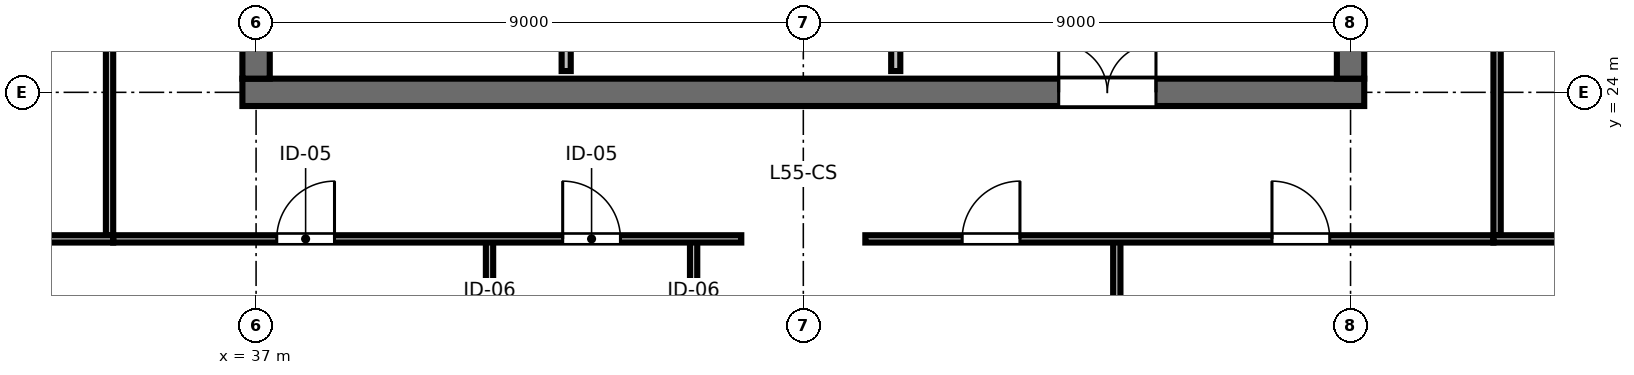
"""IFC4 building model, lengths in metres.
Left out: names, types, materials, properties, quantities, classifications, styles, units other than length and angle.
Written with IfcOpenShell. Run it as: python <this file> out.ifc"""

import sys

from ifc_helpers import new_model, si_unit, direction, frame, frame_2d, origin, place, context, subcontext, project, spatial, rectangle, extrude, element, fill, save


model = new_model("IFC4")
c1 = context("Model", 3, precision=1e-05, world=origin(), true_north=direction((0.0, 1.0)))
c2 = subcontext(c1, "Body", "Model", "MODEL_VIEW")
j1 = project(units=[si_unit("LENGTHUNIT", "METRE"), si_unit("PLANEANGLEUNIT", "RADIAN")], contexts=[c1])
p1 = place(None, origin())
s1 = spatial("IfcSite", under=j1, at=p1, CompositionType="ELEMENT")
p2 = place(p1, origin())
s2 = spatial("IfcBuilding", under=s1, at=p2, CompositionType="ELEMENT")
p3 = place(p2, frame((0.0, 0.0, 209.4)))
s3 = spatial("IfcBuildingStorey", under=s2, at=p3, CompositionType="ELEMENT", Elevation=209.4)
p4 = place(p3, frame((36.775, 24.0, 0.0), z_axis=(0.0, 0.0, 1.0), x_axis=(1.0, 0.0, 0.0)))
e1 = element("IfcWall", 1, at=p4, inside=s3, PredefinedType="SHEAR", context=c2, shape_type="SweptSolid", body=[
    extrude(rectangle(XDim=18.45, YDim=0.45, at=frame_2d((9.225, 0.0))), origin(), (0.0, 0.0, 1.0), 3.36),
])
p5 = place(p4, frame((13.425, 0.0, 0.0)))
e2 = element("IfcOpeningElement", 2, at=p5, cuts=e1, PredefinedType="OPENING", context=c2, shape_type="SweptSolid", body=[
    extrude(rectangle(XDim=1.6, YDim=2.15, at=frame_2d((0.8, 1.075))), frame((0.0, 0.235, 0.0), z_axis=(0.0, -1.0, 0.0), x_axis=(1.0, 0.0, 0.0)), (0.0, 0.0, 1.0), 0.47),
])
p6 = place(p3, frame((37.0, 24.225, 0.0), z_axis=(0.0, 0.0, 1.0), x_axis=(0.0, 1.0, 0.0)))
e3 = element("IfcWall", 3, at=p6, inside=s3, PredefinedType="SHEAR", context=c2, shape_type="SweptSolid", body=[
    extrude(rectangle(XDim=15.55, YDim=0.45, at=frame_2d((7.775, 0.0))), origin(), (0.0, 0.0, 1.0), 3.36),
])
p7 = place(p6, frame((5.3, 0.0, 0.0)))
e4 = element("IfcOpeningElement", 4, at=p7, cuts=e3, PredefinedType="OPENING", context=c2, shape_type="SweptSolid", body=[
    extrude(rectangle(XDim=1.15, YDim=2.15, at=frame_2d((0.575, 1.075))), frame((0.0, 0.235, 0.0), z_axis=(0.0, -1.0, 0.0), x_axis=(1.0, 0.0, 0.0)), (0.0, 0.0, 1.0), 0.47),
])
p8 = place(p3, frame((55.0, 24.225, 0.0), z_axis=(0.0, 0.0, 1.0), x_axis=(0.0, 1.0, 0.0)))
e5 = element("IfcWall", 5, at=p8, inside=s3, PredefinedType="SHEAR", context=c2, shape_type="SweptSolid", body=[
    extrude(rectangle(XDim=15.55, YDim=0.45, at=frame_2d((7.775, 0.0))), origin(), (0.0, 0.0, 1.0), 3.36),
])
p9 = place(p8, frame((5.3, 0.0, 0.0)))
e6 = element("IfcOpeningElement", 6, at=p9, cuts=e5, PredefinedType="OPENING", context=c2, shape_type="SweptSolid", body=[
    extrude(rectangle(XDim=1.15, YDim=2.15, at=frame_2d((0.575, 1.075))), frame((0.0, 0.235, 0.0), z_axis=(0.0, -1.0, 0.0), x_axis=(1.0, 0.0, 0.0)), (0.0, 0.0, 1.0), 0.47),
])
p10 = place(p3, frame((42.1, 24.35, 0.0), z_axis=(0.0, 0.0, 1.0), x_axis=(0.0, 1.0, 0.0)))
e7 = element("IfcWall", 7, at=p10, inside=s3, PredefinedType="PARTITIONING", context=c2, shape_type="SweptSolid", body=[
    extrude(rectangle(XDim=3.9, YDim=0.15, at=frame_2d((1.95, 0.0))), origin(), (0.0, 0.0, 1.0), 3.375),
])
p11 = place(p10, frame((1.5, 0.0, 0.0)))
e8 = element("IfcOpeningElement", 8, at=p11, cuts=e7, PredefinedType="OPENING", context=c2, shape_type="SweptSolid", body=[
    extrude(rectangle(XDim=0.9, YDim=2.15, at=frame_2d((0.45, 1.075))), frame((0.0, 0.085, 0.0), z_axis=(0.0, -1.0, 0.0), x_axis=(1.0, 0.0, 0.0)), (0.0, 0.0, 1.0), 0.17),
])
p12 = place(p3, frame((47.52, 24.35, 0.0), z_axis=(0.0, 0.0, 1.0), x_axis=(0.0, 1.0, 0.0)))
e9 = element("IfcWall", 9, at=p12, inside=s3, PredefinedType="PARTITIONING", context=c2, shape_type="SweptSolid", body=[
    extrude(rectangle(XDim=3.9, YDim=0.15, at=frame_2d((1.95, 0.0))), origin(), (0.0, 0.0, 1.0), 3.375),
])
p13 = place(p12, frame((0.35, 0.0, 0.0)))
e10 = element("IfcOpeningElement", 10, at=p13, cuts=e9, PredefinedType="OPENING", context=c2, shape_type="SweptSolid", body=[
    extrude(rectangle(XDim=0.9, YDim=2.15, at=frame_2d((0.45, 1.075))), frame((0.0, 0.085, 0.0), z_axis=(0.0, -1.0, 0.0), x_axis=(1.0, 0.0, 0.0)), (0.0, 0.0, 1.0), 0.17),
])
p14 = place(p3, frame((40.839, 21.59, 0.0), z_axis=(0.0, 0.0, 1.0), x_axis=(0.0, -1.0, 0.0)))
e11 = element("IfcWall", 11, at=p14, inside=s3, PredefinedType="PARTITIONING", context=c2, shape_type="SweptSolid", body=[
    extrude(rectangle(XDim=7.574, YDim=0.12, at=frame_2d((3.787, 0.0))), origin(), (0.0, 0.0, 1.0), 2.655),
])
p15 = place(p14, frame((1.4, 0.0, 0.0)))
e12 = element("IfcOpeningElement", 12, at=p15, cuts=e11, PredefinedType="OPENING", context=c2, shape_type="SweptSolid", body=[
    extrude(rectangle(XDim=0.9, YDim=2.15, at=frame_2d((0.45, 1.075))), frame((0.0, 0.07, 0.0), z_axis=(0.0, -1.0, 0.0), x_axis=(1.0, 0.0, 0.0)), (0.0, 0.0, 1.0), 0.14),
])
p16 = place(p3, frame((44.196, 21.59, 0.0), z_axis=(0.0, 0.0, 1.0), x_axis=(0.0, -1.0, 0.0)))
e13 = element("IfcWall", 13, at=p16, inside=s3, PredefinedType="PARTITIONING", context=c2, shape_type="SweptSolid", body=[
    extrude(rectangle(XDim=7.574, YDim=0.12, at=frame_2d((3.787, 0.0))), origin(), (0.0, 0.0, 1.0), 2.655),
])
p17 = place(p16, frame((1.4, 0.0, 0.0)))
e14 = element("IfcOpeningElement", 14, at=p17, cuts=e13, PredefinedType="OPENING", context=c2, shape_type="SweptSolid", body=[
    extrude(rectangle(XDim=0.9, YDim=2.15, at=frame_2d((0.45, 1.075))), frame((0.0, 0.07, 0.0), z_axis=(0.0, -1.0, 0.0), x_axis=(1.0, 0.0, 0.0)), (0.0, 0.0, 1.0), 0.14),
])
p18 = place(p3, frame((51.156, 21.59, 0.0), z_axis=(0.0, 0.0, 1.0), x_axis=(0.0, -1.0, 0.0)))
e15 = element("IfcWall", 15, at=p18, inside=s3, PredefinedType="PARTITIONING", context=c2, shape_type="SweptSolid", body=[
    extrude(rectangle(XDim=7.574, YDim=0.12, at=frame_2d((3.787, 0.0))), origin(), (0.0, 0.0, 1.0), 2.655),
])
p19 = place(p18, frame((1.4, 0.0, 0.0)))
e16 = element("IfcOpeningElement", 16, at=p19, cuts=e15, PredefinedType="OPENING", context=c2, shape_type="SweptSolid", body=[
    extrude(rectangle(XDim=0.9, YDim=2.15, at=frame_2d((0.45, 1.075))), frame((0.0, 0.07, 0.0), z_axis=(0.0, -1.0, 0.0), x_axis=(1.0, 0.0, 0.0)), (0.0, 0.0, 1.0), 0.14),
])
p20 = place(p3, frame((34.65, 21.59, 0.0), z_axis=(0.0, 0.0, 1.0), x_axis=(1.0, 0.0, 0.0)))
e17 = element("IfcWall", 17, at=p20, inside=s3, PredefinedType="PARTITIONING", context=c2, shape_type="SweptSolid", body=[
    extrude(rectangle(XDim=10.33, YDim=0.12, at=frame_2d((5.165, 0.0))), origin(), (0.0, 0.0, 1.0), 2.655),
])
p21 = place(p20, frame((2.69, 0.0, 0.0)))
e18 = element("IfcOpeningElement", 18, at=p21, cuts=e17, PredefinedType="OPENING", context=c2, shape_type="SweptSolid", body=[
    extrude(rectangle(XDim=0.95, YDim=2.15, at=frame_2d((0.475, 1.075))), frame((0.0, 0.07, 0.0), z_axis=(0.0, -1.0, 0.0), x_axis=(1.0, 0.0, 0.0)), (0.0, 0.0, 1.0), 0.14),
])
p22 = place(p20, frame((7.393, 0.0, 0.0)))
e19 = element("IfcOpeningElement", 19, at=p22, cuts=e17, PredefinedType="OPENING", context=c2, shape_type="SweptSolid", body=[
    extrude(rectangle(XDim=0.95, YDim=2.15, at=frame_2d((0.475, 1.075))), frame((0.0, 0.07, 0.0), z_axis=(0.0, -1.0, 0.0), x_axis=(1.0, 0.0, 0.0)), (0.0, 0.0, 1.0), 0.14),
])
p23 = place(p3, frame((47.02, 21.59, 0.0), z_axis=(0.0, 0.0, 1.0), x_axis=(1.0, 0.0, 0.0)))
e20 = element("IfcWall", 20, at=p23, inside=s3, PredefinedType="PARTITIONING", context=c2, shape_type="SweptSolid", body=[
    extrude(rectangle(XDim=10.33, YDim=0.12, at=frame_2d((5.165, 0.0))), origin(), (0.0, 0.0, 1.0), 2.655),
])
p24 = place(p23, frame((1.593, 0.0, 0.0)))
e21 = element("IfcOpeningElement", 21, at=p24, cuts=e20, PredefinedType="OPENING", context=c2, shape_type="SweptSolid", body=[
    extrude(rectangle(XDim=0.95, YDim=2.15, at=frame_2d((0.475, 1.075))), frame((0.0, 0.07, 0.0), z_axis=(0.0, -1.0, 0.0), x_axis=(1.0, 0.0, 0.0)), (0.0, 0.0, 1.0), 0.14),
])
p25 = place(p23, frame((6.688, 0.0, 0.0)))
e22 = element("IfcOpeningElement", 22, at=p25, cuts=e20, PredefinedType="OPENING", context=c2, shape_type="SweptSolid", body=[
    extrude(rectangle(XDim=0.95, YDim=2.15, at=frame_2d((0.475, 1.075))), frame((0.0, 0.07, 0.0), z_axis=(0.0, -1.0, 0.0), x_axis=(1.0, 0.0, 0.0)), (0.0, 0.0, 1.0), 0.14),
])
p26 = place(p3, frame((34.59, 21.65, 0.0), z_axis=(0.0, 0.0, 1.0), x_axis=(0.0, 1.0, 0.0)))
e23 = element("IfcWall", 23, at=p26, inside=s3, PredefinedType="PARTITIONING", context=c2, shape_type="SweptSolid", body=[
    extrude(rectangle(XDim=20.7, YDim=0.12, at=frame_2d((10.35, 0.0))), origin(), (0.0, 0.0, 1.0), 2.655),
])
p27 = place(p26, frame((9.875, 0.0, 0.0)))
e24 = element("IfcOpeningElement", 24, at=p27, cuts=e23, PredefinedType="OPENING", context=c2, shape_type="SweptSolid", body=[
    extrude(rectangle(XDim=0.95, YDim=2.15, at=frame_2d((0.475, 1.075))), frame((0.0, 0.07, 0.0), z_axis=(0.0, -1.0, 0.0), x_axis=(1.0, 0.0, 0.0)), (0.0, 0.0, 1.0), 0.14),
])
p28 = place(p3, frame((57.41, 21.65, 0.0), z_axis=(0.0, 0.0, 1.0), x_axis=(0.0, 1.0, 0.0)))
e25 = element("IfcWall", 25, at=p28, inside=s3, PredefinedType="PARTITIONING", context=c2, shape_type="SweptSolid", body=[
    extrude(rectangle(XDim=20.7, YDim=0.12, at=frame_2d((10.35, 0.0))), origin(), (0.0, 0.0, 1.0), 2.655),
])
p29 = place(p28, frame((3.546, 0.0, 0.0)))
e26 = element("IfcOpeningElement", 26, at=p29, cuts=e25, PredefinedType="OPENING", context=c2, shape_type="SweptSolid", body=[
    extrude(rectangle(XDim=0.95, YDim=2.15, at=frame_2d((0.475, 1.075))), frame((0.0, 0.07, 0.0), z_axis=(0.0, -1.0, 0.0), x_axis=(1.0, 0.0, 0.0)), (0.0, 0.0, 1.0), 0.14),
])
p30 = place(p28, frame((10.054, 0.0, 0.0)))
e27 = element("IfcOpeningElement", 27, at=p30, cuts=e25, PredefinedType="OPENING", context=c2, shape_type="SweptSolid", body=[
    extrude(rectangle(XDim=0.95, YDim=2.15, at=frame_2d((0.475, 1.075))), frame((0.0, 0.07, 0.0), z_axis=(0.0, -1.0, 0.0), x_axis=(1.0, 0.0, 0.0)), (0.0, 0.0, 1.0), 0.14),
])
p31 = place(p28, frame((16.384, 0.0, 0.0)))
e28 = element("IfcOpeningElement", 28, at=p31, cuts=e25, PredefinedType="OPENING", context=c2, shape_type="SweptSolid", body=[
    extrude(rectangle(XDim=0.95, YDim=2.15, at=frame_2d((0.475, 1.075))), frame((0.0, 0.07, 0.0), z_axis=(0.0, -1.0, 0.0), x_axis=(1.0, 0.0, 0.0)), (0.0, 0.0, 1.0), 0.14),
])
for number, where, z_axis, x_axis in (
    (29, (34.65, 21.59, 0.0), (0.0, 0.0, 1.0), (-1.0, 0.0, 0.0)),
    (30, (57.35, 21.59, 0.0), (0.0, 0.0, 1.0), (1.0, 0.0, 0.0)),
):
    element("IfcWall", number, at=place(p3, frame(where, z_axis=z_axis, x_axis=x_axis)), inside=s3, PredefinedType="PARTITIONING", context=c2, shape_type="SweptSolid", body=[
        extrude(rectangle(XDim=8.856, YDim=0.12, at=frame_2d((4.428, 0.0))), origin(), (0.0, 0.0, 1.0), 2.655),
    ])
p32 = place(p5, origin())
e31 = element("IfcDoor", 31, at=p32, inside=s3, OperationType="DOUBLE_DOOR_SINGLE_SWING", PredefinedType="DOOR", context=c2, shape_type="SweptSolid", body=[
    extrude(rectangle(XDim=1.6, YDim=2.15, at=frame_2d((0.8, 1.075))), frame((0.0, 0.025, 0.0), z_axis=(0.0, -1.0, 0.0), x_axis=(1.0, 0.0, 0.0)), (0.0, 0.0, 1.0), 0.05),
])
fill(e2, e31)
p33 = place(p21, origin())
e32 = element("IfcDoor", 32, at=p33, inside=s3, OperationType="SINGLE_SWING_RIGHT", PredefinedType="DOOR", context=c2, shape_type="SweptSolid", body=[
    extrude(rectangle(XDim=0.95, YDim=2.15, at=frame_2d((0.475, 1.075))), frame((0.0, 0.025, 0.0), z_axis=(0.0, -1.0, 0.0), x_axis=(1.0, 0.0, 0.0)), (0.0, 0.0, 1.0), 0.05),
])
fill(e18, e32)
p34 = place(p22, origin())
e33 = element("IfcDoor", 33, at=p34, inside=s3, OperationType="SINGLE_SWING_LEFT", PredefinedType="DOOR", context=c2, shape_type="SweptSolid", body=[
    extrude(rectangle(XDim=0.95, YDim=2.15, at=frame_2d((0.475, 1.075))), frame((0.0, 0.025, 0.0), z_axis=(0.0, -1.0, 0.0), x_axis=(1.0, 0.0, 0.0)), (0.0, 0.0, 1.0), 0.05),
])
fill(e19, e33)
p35 = place(p24, origin())
e34 = element("IfcDoor", 34, at=p35, inside=s3, OperationType="SINGLE_SWING_RIGHT", PredefinedType="DOOR", context=c2, shape_type="SweptSolid", body=[
    extrude(rectangle(XDim=0.95, YDim=2.15, at=frame_2d((0.475, 1.075))), frame((0.0, 0.025, 0.0), z_axis=(0.0, -1.0, 0.0), x_axis=(1.0, 0.0, 0.0)), (0.0, 0.0, 1.0), 0.05),
])
fill(e21, e34)
p36 = place(p25, origin())
e35 = element("IfcDoor", 35, at=p36, inside=s3, OperationType="SINGLE_SWING_LEFT", PredefinedType="DOOR", context=c2, shape_type="SweptSolid", body=[
    extrude(rectangle(XDim=0.95, YDim=2.15, at=frame_2d((0.475, 1.075))), frame((0.0, 0.025, 0.0), z_axis=(0.0, -1.0, 0.0), x_axis=(1.0, 0.0, 0.0)), (0.0, 0.0, 1.0), 0.05),
])
fill(e22, e35)
save(model, sys.argv[1])
